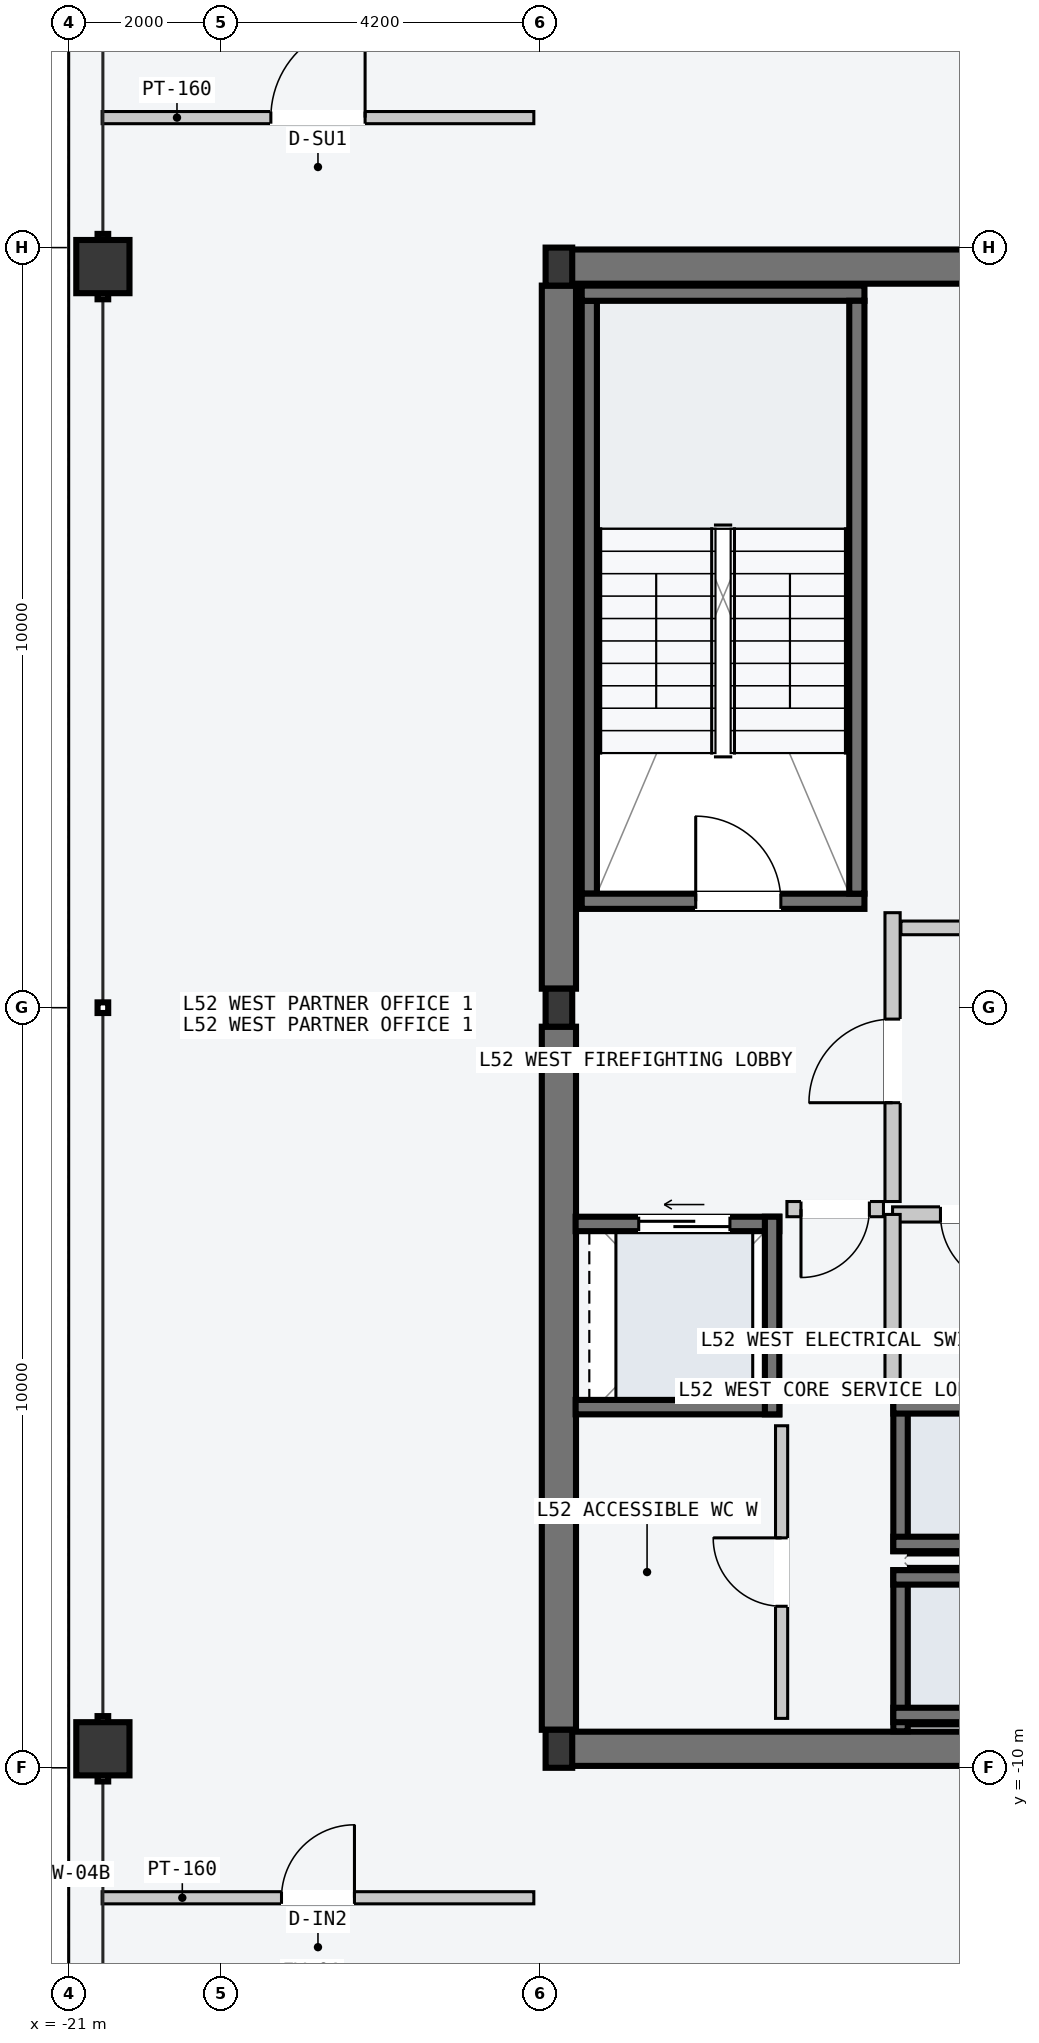
"""IFC4 building model, lengths in metres.
Left out: names, types, materials, properties, quantities, classifications, styles, units other than length and angle.
Written with IfcOpenShell. Run it as: python <this file> out.ifc"""

import sys

from ifc_helpers import new_model, si_unit, direction, frame, frame_2d, origin, origin_2d, place, context, subcontext, project, spatial, rectangle, hollow_rectangle, i_section, extrude, element, fill, save


model = new_model("IFC4")
c1 = context("Model", 3, precision=1e-05, world=origin(), true_north=direction((0.0, 1.0)))
c2 = subcontext(c1, "Body", "Model", "MODEL_VIEW")
j1 = project(units=[si_unit("LENGTHUNIT", "METRE"), si_unit("PLANEANGLEUNIT", "RADIAN")], contexts=[c1])
p1 = place(None, origin())
s1 = spatial("IfcSite", under=j1, at=p1, CompositionType="ELEMENT")
p2 = place(p1, origin())
s2 = spatial("IfcBuilding", under=s1, at=p2, CompositionType="ELEMENT")
p3 = place(p2, frame((0.0, 0.0, 198.3)))
s3 = spatial("IfcBuildingStorey", under=s2, at=p3, CompositionType="ELEMENT", Elevation=198.3)
for number, where, z_axis, x_axis in (
    (1, (-14.53, -9.75, -0.2), (0.0, 0.0, 1.0), (1.0, 0.0, 0.0)),
    (2, (-14.53, 9.75, -0.2), (0.0, 0.0, 1.0), (1.0, 0.0, 0.0)),
):
    element("IfcWall", number, at=place(p3, frame(where, z_axis=z_axis, x_axis=x_axis)), inside=s3, PredefinedType="SHEAR", context=c2, shape_type="SweptSolid", body=[
        extrude(rectangle(XDim=6.46, YDim=0.45, at=frame_2d((3.23, 0.0))), origin(), (0.0, 0.0, 1.0), 3.6),
    ])
for number, where, z_axis, x_axis in (
    (3, (-14.55, -9.5, -0.2), (0.0, 0.0, 1.0), (0.0, 1.0, 0.0)),
    (4, (-14.55, 0.25, -0.2), (0.0, 0.0, 1.0), (0.0, 1.0, 0.0)),
):
    element("IfcWall", number, at=place(p3, frame(where, z_axis=z_axis, x_axis=x_axis)), inside=s3, PredefinedType="SHEAR", context=c2, shape_type="SweptSolid", body=[
        extrude(rectangle(XDim=9.25, YDim=0.45, at=frame_2d((4.625, 0.0))), origin(), (0.0, 0.0, 1.0), 3.6),
    ])
p4 = place(p3, frame((-14.15, 1.5, -0.2), z_axis=(0.0, 0.0, 1.0), x_axis=(0.0, 1.0, 0.0)))
e5 = element("IfcWall", 5, at=p4, inside=s3, PredefinedType="SOLIDWALL", context=c2, shape_type="SweptSolid", body=[
    extrude(rectangle(XDim=7.8, YDim=0.2, at=frame_2d((3.9, 0.0))), origin(), (0.0, 0.0, 1.0), 3.6),
])
p5 = place(p3, frame((-14.25, 1.4, -0.2), z_axis=(0.0, 0.0, 1.0), x_axis=(1.0, 0.0, 0.0)))
e6 = element("IfcWall", 6, at=p5, inside=s3, PredefinedType="SOLIDWALL", context=c2, shape_type="SweptSolid", body=[
    extrude(rectangle(XDim=3.72, YDim=0.2, at=frame_2d((1.86, 0.0))), origin(), (0.0, 0.0, 1.0), 3.6),
])
p6 = place(p5, frame((1.5, 0.0, 0.2)))
e7 = element("IfcOpeningElement", 7, at=p6, cuts=e6, PredefinedType="OPENING", context=c2, shape_type="SweptSolid", body=[
    extrude(rectangle(XDim=1.12, YDim=2.18, at=frame_2d((0.56, 1.09))), frame((0.0, 0.11, 0.0), z_axis=(0.0, -1.0, 0.0), x_axis=(1.0, 0.0, 0.0)), (0.0, 0.0, 1.0), 0.22),
])
p7 = place(p3, frame((-14.25, 9.4, -0.2), z_axis=(0.0, 0.0, 1.0), x_axis=(1.0, 0.0, 0.0)))
e8 = element("IfcWall", 8, at=p7, inside=s3, PredefinedType="SOLIDWALL", context=c2, shape_type="SweptSolid", body=[
    extrude(rectangle(XDim=3.72, YDim=0.2, at=frame_2d((1.86, 0.0))), origin(), (0.0, 0.0, 1.0), 3.6),
])
p8 = place(p3, frame((-10.63, 1.5, -0.2), z_axis=(0.0, 0.0, 1.0), x_axis=(0.0, 1.0, 0.0)))
e9 = element("IfcWall", 9, at=p8, inside=s3, PredefinedType="SOLIDWALL", context=c2, shape_type="SweptSolid", body=[
    extrude(rectangle(XDim=7.8, YDim=0.2, at=frame_2d((3.9, 0.0))), origin(), (0.0, 0.0, 1.0), 3.6),
])
for number, where, z_axis, x_axis in (
    (10, (-14.55, -9.75, 0.0), (0.0, 0.0, 1.0), (1.0, 0.0, 0.0)),
    (11, (-14.55, 0.0, 0.0), (0.0, 0.0, 1.0), (1.0, 0.0, 0.0)),
    (12, (-14.55, 9.75, 0.0), (0.0, 0.0, 1.0), (1.0, 0.0, 0.0)),
):
    element("IfcColumn", number, at=place(p3, frame(where, z_axis=z_axis, x_axis=x_axis)), inside=s3, PredefinedType="COLUMN", context=c2, shape_type="SweptSolid", body=[
        extrude(i_section(OverallWidth=0.35, OverallDepth=0.5, WebThickness=0.02, FlangeThickness=0.032, at=origin_2d()), origin(), (0.0, 0.0, 1.0), 3.6),
    ])
for number, where, z_axis, x_axis in (
    (13, (-20.55, -9.75, 0.0), (0.0, 0.0, 1.0), (0.0, 1.0, 0.0)),
    (14, (-20.55, 9.75, 0.0), (0.0, 0.0, 1.0), (0.0, 1.0, 0.0)),
):
    element("IfcColumn", number, at=place(p3, frame(where, z_axis=z_axis, x_axis=x_axis)), inside=s3, PredefinedType="COLUMN", context=c2, shape_type="SweptSolid", body=[
        extrude(hollow_rectangle(XDim=0.7, YDim=0.7, WallThickness=0.03, at=origin_2d()), origin(), (0.0, 0.0, 1.0), 3.6),
    ])
p9 = place(p3, frame((-10.055, -9.52, -0.2), z_axis=(0.0, 0.0, 1.0), x_axis=(0.0, 1.0, 0.0)))
e15 = element("IfcWall", 15, at=p9, inside=s3, PredefinedType="SOLIDWALL", context=c2, shape_type="SweptSolid", body=[
    extrude(rectangle(XDim=2.12, YDim=0.19, at=frame_2d((1.06, 0.0))), origin(), (0.0, 0.0, 1.0), 3.6),
])
for number, where, z_axis, x_axis in (
    (16, (-10.15, -7.495, -0.2), (0.0, 0.0, 1.0), (1.0, 0.0, 0.0)),
    (17, (-10.15, -9.305, -0.2), (0.0, 0.0, 1.0), (1.0, 0.0, 0.0)),
):
    element("IfcWall", number, at=place(p3, frame(where, z_axis=z_axis, x_axis=x_axis)), inside=s3, PredefinedType="SOLIDWALL", context=c2, shape_type="SweptSolid", body=[
        extrude(rectangle(XDim=2.2, YDim=0.19, at=frame_2d((1.1, 0.0))), origin(), (0.0, 0.0, 1.0), 3.6),
    ])
p10 = place(p3, frame((-10.055, -7.15, -0.2), z_axis=(0.0, 0.0, 1.0), x_axis=(0.0, 1.0, 0.0)))
e18 = element("IfcWall", 18, at=p10, inside=s3, PredefinedType="SOLIDWALL", context=c2, shape_type="SweptSolid", body=[
    extrude(rectangle(XDim=2.0, YDim=0.19, at=frame_2d((1.0, 0.0))), origin(), (0.0, 0.0, 1.0), 3.6),
])
for number, where, z_axis, x_axis in (
    (19, (-10.15, -5.245, -0.2), (0.0, 0.0, 1.0), (1.0, 0.0, 0.0)),
    (20, (-10.15, -7.055, -0.2), (0.0, 0.0, 1.0), (1.0, 0.0, 0.0)),
):
    element("IfcWall", number, at=place(p3, frame(where, z_axis=z_axis, x_axis=x_axis)), inside=s3, PredefinedType="SOLIDWALL", context=c2, shape_type="SweptSolid", body=[
        extrude(rectangle(XDim=2.2, YDim=0.19, at=frame_2d((1.1, 0.0))), origin(), (0.0, 0.0, 1.0), 3.6),
    ])
p11 = place(p3, frame((-14.33, -2.845, -0.2), z_axis=(0.0, 0.0, 1.0), x_axis=(1.0, 0.0, 0.0)))
e21 = element("IfcWall", 21, at=p11, inside=s3, PredefinedType="SOLIDWALL", context=c2, shape_type="SweptSolid", body=[
    extrude(rectangle(XDim=2.68, YDim=0.19, at=frame_2d((1.34, 0.0))), origin(), (0.0, 0.0, 1.0), 3.6),
])
p12 = place(p11, frame((0.83, 0.0, 0.2)))
e22 = element("IfcOpeningElement", 22, at=p12, cuts=e21, PredefinedType="OPENING", context=c2, shape_type="SweptSolid", body=[
    extrude(rectangle(XDim=1.2, YDim=2.2, at=frame_2d((0.6, 1.1))), frame((0.0, 0.105, 0.0), z_axis=(0.0, -1.0, 0.0), x_axis=(1.0, 0.0, 0.0)), (0.0, 0.0, 1.0), 0.21),
])
p13 = place(p3, frame((-14.33, -5.255, -0.2), z_axis=(0.0, 0.0, 1.0), x_axis=(1.0, 0.0, 0.0)))
e23 = element("IfcWall", 23, at=p13, inside=s3, PredefinedType="SOLIDWALL", context=c2, shape_type="SweptSolid", body=[
    extrude(rectangle(XDim=2.68, YDim=0.19, at=frame_2d((1.34, 0.0))), origin(), (0.0, 0.0, 1.0), 3.6),
])
p14 = place(p3, frame((-11.745, -5.35, -0.2), z_axis=(0.0, 0.0, 1.0), x_axis=(0.0, 1.0, 0.0)))
e24 = element("IfcWall", 24, at=p14, inside=s3, PredefinedType="SOLIDWALL", context=c2, shape_type="SweptSolid", body=[
    extrude(rectangle(XDim=2.6, YDim=0.19, at=frame_2d((1.3, 0.0))), origin(), (0.0, 0.0, 1.0), 3.6),
])
p15 = place(p3, frame((-10.16, -2.55, 0.0), z_axis=(0.0, 0.0, 1.0), x_axis=(0.0, 1.0, 0.0)))
e25 = element("IfcWall", 25, at=p15, inside=s3, PredefinedType="PARTITIONING", context=c2, shape_type="SweptSolid", body=[
    extrude(rectangle(XDim=3.8, YDim=0.2, at=frame_2d((1.9, 0.0))), origin(), (0.0, 0.0, 1.0), 3.4),
])
p16 = place(p15, frame((1.3, 0.0, 0.0)))
e26 = element("IfcOpeningElement", 26, at=p16, cuts=e25, PredefinedType="OPENING", context=c2, shape_type="SweptSolid", body=[
    extrude(rectangle(XDim=1.1, YDim=2.15, at=frame_2d((0.55, 1.075))), frame((0.0, 0.11, 0.0), z_axis=(0.0, -1.0, 0.0), x_axis=(1.0, 0.0, 0.0)), (0.0, 0.0, 1.0), 0.22),
])
p17 = place(p3, frame((-10.28, -2.65, 0.0), z_axis=(0.0, 0.0, 1.0), x_axis=(-1.0, 0.0, 0.0)))
e27 = element("IfcWall", 27, at=p17, inside=s3, PredefinedType="PARTITIONING", context=c2, shape_type="SweptSolid", body=[
    extrude(rectangle(XDim=1.27, YDim=0.2, at=frame_2d((0.635, 0.0))), origin(), (0.0, 0.0, 1.0), 3.4),
])
p18 = place(p17, frame((0.185, 0.0, 0.0)))
e28 = element("IfcOpeningElement", 28, at=p18, cuts=e27, PredefinedType="OPENING", context=c2, shape_type="SweptSolid", body=[
    extrude(rectangle(XDim=0.9, YDim=2.15, at=frame_2d((0.45, 1.075))), frame((0.0, 0.11, 0.0), z_axis=(0.0, -1.0, 0.0), x_axis=(1.0, 0.0, 0.0)), (0.0, 0.0, 1.0), 0.22),
])
p19 = place(p3, frame((-7.96, -2.72, 0.0), z_axis=(0.0, 0.0, 1.0), x_axis=(-1.0, 0.0, 0.0)))
e29 = element("IfcWall", 29, at=p19, inside=s3, PredefinedType="PARTITIONING", context=c2, shape_type="SweptSolid", body=[
    extrude(rectangle(XDim=2.2, YDim=0.2, at=frame_2d((1.1, 0.0))), origin(), (0.0, 0.0, 1.0), 3.4),
])
p20 = place(p19, frame((0.62, 0.0, 0.0)))
e30 = element("IfcOpeningElement", 30, at=p20, cuts=e29, PredefinedType="OPENING", context=c2, shape_type="SweptSolid", body=[
    extrude(rectangle(XDim=0.95, YDim=2.1, at=frame_2d((0.475, 1.05))), frame((0.0, 0.11, 0.0), z_axis=(0.0, -1.0, 0.0), x_axis=(1.0, 0.0, 0.0)), (0.0, 0.0, 1.0), 0.22),
])
p21 = place(p3, frame((-10.16, -5.16, 0.0), z_axis=(0.0, 0.0, 1.0), x_axis=(0.0, 1.0, 0.0)))
e31 = element("IfcWall", 31, at=p21, inside=s3, PredefinedType="PARTITIONING", context=c2, shape_type="SweptSolid", body=[
    extrude(rectangle(XDim=2.44, YDim=0.2, at=frame_2d((1.22, 0.0))), origin(), (0.0, 0.0, 1.0), 3.4),
])
p22 = place(p3, frame((-11.62, -9.35, 0.0), z_axis=(0.0, 0.0, 1.0), x_axis=(0.0, 1.0, 0.0)))
e32 = element("IfcWall", 32, at=p22, inside=s3, PredefinedType="PARTITIONING", context=c2, shape_type="SweptSolid", body=[
    extrude(rectangle(XDim=3.85, YDim=0.16, at=frame_2d((1.925, 0.0))), origin(), (0.0, 0.0, 1.0), 3.4),
])
p23 = place(p22, frame((1.475, 0.0, 0.0)))
e33 = element("IfcOpeningElement", 33, at=p23, cuts=e32, PredefinedType="OPENING", context=c2, shape_type="SweptSolid", body=[
    extrude(rectangle(XDim=0.9, YDim=2.15, at=frame_2d((0.45, 1.075))), frame((0.0, 0.09, 0.0), z_axis=(0.0, -1.0, 0.0), x_axis=(1.0, 0.0, 0.0)), (0.0, 0.0, 1.0), 0.18),
])
p24 = place(p3, frame((-10.05, 1.05, 0.0), z_axis=(0.0, 0.0, 1.0), x_axis=(1.0, 0.0, 0.0)))
e34 = element("IfcWall", 34, at=p24, inside=s3, PredefinedType="PARTITIONING", context=c2, shape_type="SweptSolid", body=[
    extrude(rectangle(XDim=8.79, YDim=0.18, at=frame_2d((4.395, 0.0))), origin(), (0.0, 0.0, 1.0), 3.4),
])
p25 = place(p3, frame((-20.56, 11.71, 0.0), z_axis=(0.0, 0.0, 1.0), x_axis=(1.0, 0.0, 0.0)))
e35 = element("IfcWall", 35, at=p25, inside=s3, PredefinedType="PARTITIONING", context=c2, shape_type="SweptSolid", body=[
    extrude(rectangle(XDim=5.68, YDim=0.16, at=frame_2d((2.84, 0.0))), origin(), (0.0, 0.0, 1.0), 3.4),
])
p26 = place(p25, frame((2.22, 0.0, 0.0)))
e36 = element("IfcOpeningElement", 36, at=p26, cuts=e35, PredefinedType="OPENING", context=c2, shape_type="SweptSolid", body=[
    extrude(rectangle(XDim=1.24, YDim=2.24, at=frame_2d((0.62, 1.12))), frame((0.0, 0.09, 0.0), z_axis=(0.0, -1.0, 0.0), x_axis=(1.0, 0.0, 0.0)), (0.0, 0.0, 1.0), 0.18),
])
p27 = place(p3, frame((-20.56, -11.71, 0.0), z_axis=(0.0, 0.0, 1.0), x_axis=(1.0, 0.0, 0.0)))
e37 = element("IfcWall", 37, at=p27, inside=s3, PredefinedType="PARTITIONING", context=c2, shape_type="SweptSolid", body=[
    extrude(rectangle(XDim=5.68, YDim=0.16, at=frame_2d((2.84, 0.0))), origin(), (0.0, 0.0, 1.0), 3.4),
])
p28 = place(p27, frame((2.36, 0.0, 0.0)))
e38 = element("IfcOpeningElement", 38, at=p28, cuts=e37, PredefinedType="OPENING", context=c2, shape_type="SweptSolid", body=[
    extrude(rectangle(XDim=0.96, YDim=2.18, at=frame_2d((0.48, 1.09))), frame((0.0, 0.09, 0.0), z_axis=(0.0, -1.0, 0.0), x_axis=(1.0, 0.0, 0.0)), (0.0, 0.0, 1.0), 0.18),
])
p29 = place(p6, origin())
e39 = element("IfcDoor", 39, at=p29, inside=s3, OperationType="SINGLE_SWING_LEFT", PredefinedType="DOOR", context=c2, shape_type="SweptSolid", body=[
    extrude(rectangle(XDim=1.12, YDim=2.18, at=frame_2d((0.56, 1.09))), frame((0.0, 0.025, 0.0), z_axis=(0.0, -1.0, 0.0), x_axis=(1.0, 0.0, 0.0)), (0.0, 0.0, 1.0), 0.05),
])
fill(e7, e39)
p30 = place(p12, origin())
e40 = element("IfcDoor", 40, at=p30, inside=s3, OperationType="SLIDING_TO_LEFT", PredefinedType="DOOR", context=c2, shape_type="SweptSolid", body=[
    extrude(rectangle(XDim=1.2, YDim=2.2, at=frame_2d((0.6, 1.1))), frame((0.0, 0.025, 0.0), z_axis=(0.0, -1.0, 0.0), x_axis=(1.0, 0.0, 0.0)), (0.0, 0.0, 1.0), 0.05),
])
fill(e22, e40)
p31 = place(p16, origin())
e41 = element("IfcDoor", 41, at=p31, inside=s3, OperationType="SINGLE_SWING_LEFT", PredefinedType="DOOR", context=c2, shape_type="SweptSolid", body=[
    extrude(rectangle(XDim=1.1, YDim=2.15, at=frame_2d((0.55, 1.075))), frame((0.0, 0.025, 0.0), z_axis=(0.0, -1.0, 0.0), x_axis=(1.0, 0.0, 0.0)), (0.0, 0.0, 1.0), 0.05),
])
fill(e26, e41)
p32 = place(p18, origin())
e42 = element("IfcDoor", 42, at=p32, inside=s3, OperationType="SINGLE_SWING_RIGHT", PredefinedType="DOOR", context=c2, shape_type="SweptSolid", body=[
    extrude(rectangle(XDim=0.9, YDim=2.15, at=frame_2d((0.45, 1.075))), frame((0.0, 0.025, 0.0), z_axis=(0.0, -1.0, 0.0), x_axis=(1.0, 0.0, 0.0)), (0.0, 0.0, 1.0), 0.05),
])
fill(e28, e42)
p33 = place(p20, origin())
e43 = element("IfcDoor", 43, at=p33, inside=s3, OperationType="SINGLE_SWING_LEFT", PredefinedType="DOOR", context=c2, shape_type="SweptSolid", body=[
    extrude(rectangle(XDim=0.95, YDim=2.1, at=frame_2d((0.475, 1.05))), frame((0.0, 0.025, 0.0), z_axis=(0.0, -1.0, 0.0), x_axis=(1.0, 0.0, 0.0)), (0.0, 0.0, 1.0), 0.05),
])
fill(e30, e43)
p34 = place(p23, origin())
e44 = element("IfcDoor", 44, at=p34, inside=s3, OperationType="SINGLE_SWING_RIGHT", PredefinedType="DOOR", context=c2, shape_type="SweptSolid", body=[
    extrude(rectangle(XDim=0.9, YDim=2.15, at=frame_2d((0.45, 1.075))), frame((0.0, 0.025, 0.0), z_axis=(0.0, -1.0, 0.0), x_axis=(1.0, 0.0, 0.0)), (0.0, 0.0, 1.0), 0.05),
])
fill(e33, e44)
p35 = place(p26, origin())
e45 = element("IfcDoor", 45, at=p35, inside=s3, OperationType="SINGLE_SWING_RIGHT", PredefinedType="DOOR", context=c2, shape_type="SweptSolid", body=[
    extrude(rectangle(XDim=1.24, YDim=2.24, at=frame_2d((0.62, 1.12))), frame((0.0, 0.025, 0.0), z_axis=(0.0, -1.0, 0.0), x_axis=(1.0, 0.0, 0.0)), (0.0, 0.0, 1.0), 0.05),
])
fill(e36, e45)
p36 = place(p28, origin())
e46 = element("IfcDoor", 46, at=p36, inside=s3, OperationType="SINGLE_SWING_RIGHT", PredefinedType="DOOR", context=c2, shape_type="SweptSolid", body=[
    extrude(rectangle(XDim=0.96, YDim=2.18, at=frame_2d((0.48, 1.09))), frame((0.0, 0.025, 0.0), z_axis=(0.0, -1.0, 0.0), x_axis=(1.0, 0.0, 0.0)), (0.0, 0.0, 1.0), 0.05),
])
fill(e38, e46)
save(model, sys.argv[1])
